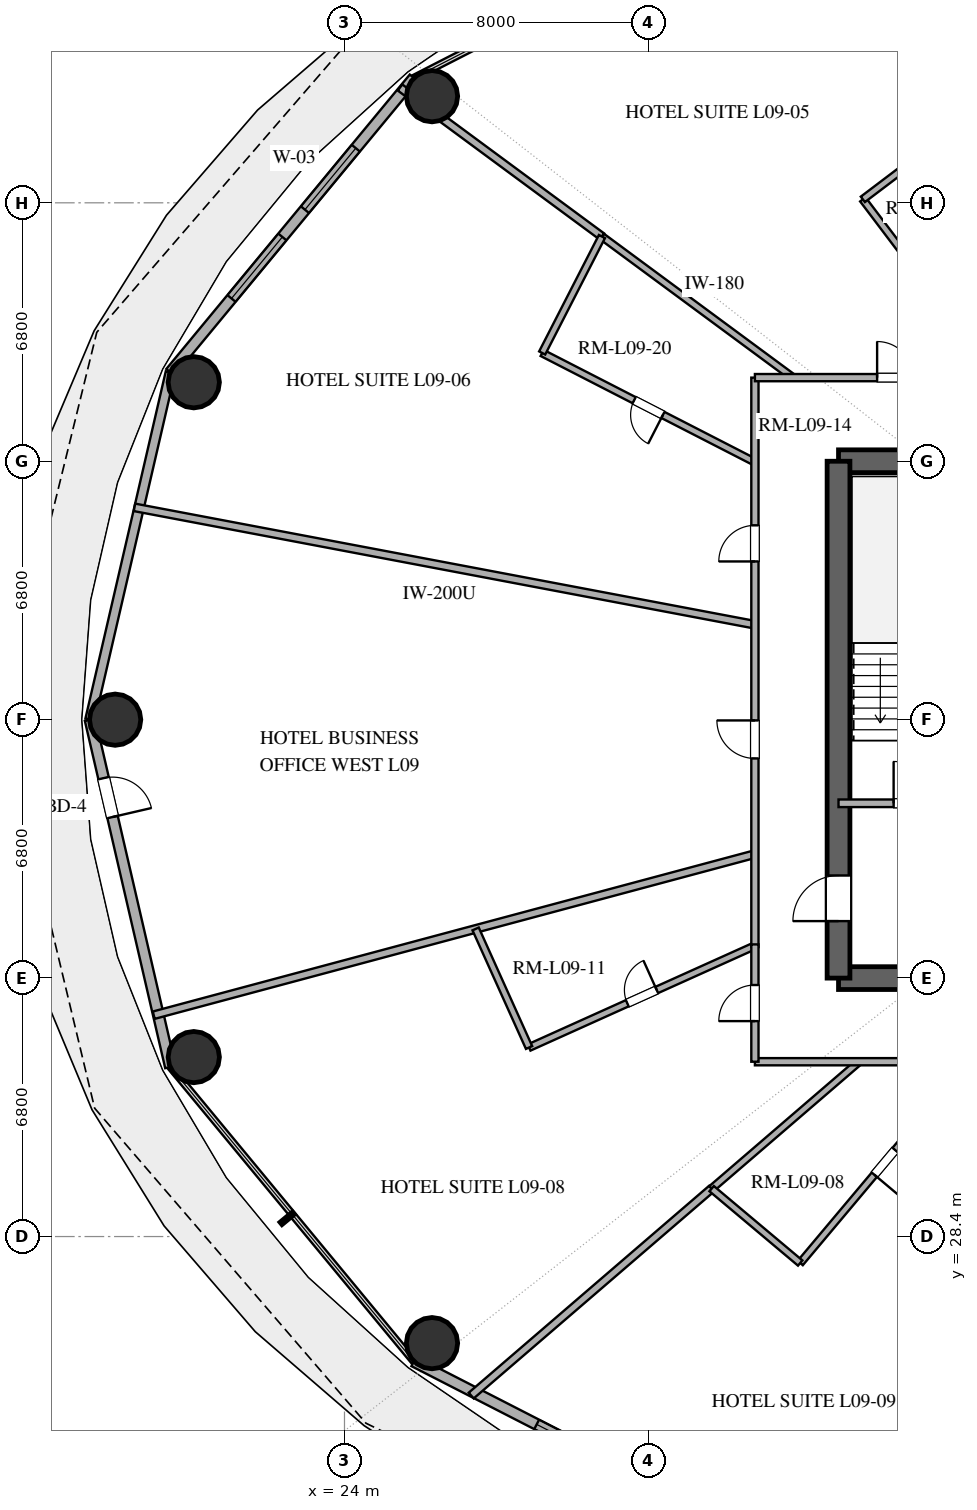
"""IFC4 building model, lengths in metres.
Left out: names, types, materials, properties, quantities, classifications, styles, units other than length and angle.
Written with IfcOpenShell. Run it as: python <this file> out.ifc"""

import sys

from ifc_helpers import new_model, si_unit, direction, frame, frame_2d, origin, origin_2d, place, context, subcontext, project, spatial, rectangle, hollow_circle, extrude, element, fill, save


model = new_model("IFC4")
c1 = context("Model", 3, precision=1e-05, world=origin(), true_north=direction((0.0, 1.0)))
c2 = subcontext(c1, "Body", "Model", "MODEL_VIEW")
j1 = project(units=[si_unit("LENGTHUNIT", "METRE"), si_unit("PLANEANGLEUNIT", "RADIAN")], contexts=[c1])
p1 = place(None, origin())
s1 = spatial("IfcSite", under=j1, at=p1, CompositionType="ELEMENT")
p2 = place(p1, origin())
s2 = spatial("IfcBuilding", under=s1, at=p2, CompositionType="ELEMENT")
p3 = place(p2, frame((0.0, 0.0, 42.6)))
s3 = spatial("IfcBuildingStorey", under=s2, at=p3, CompositionType="ELEMENT", Elevation=42.6)
for number, where, z_axis, x_axis in (
    (1, (37.0, 35.2, 0.0), (0.0, 0.0, 1.0), (1.0, 0.0, 0.0)),
    (2, (37.0, 48.8, 0.0), (0.0, 0.0, 1.0), (1.0, 0.0, 0.0)),
):
    element("IfcWall", number, at=place(p3, frame(where, z_axis=z_axis, x_axis=x_axis)), inside=s3, PredefinedType="SHEAR", context=c2, shape_type="SweptSolid", body=[
        extrude(rectangle(XDim=4.0, YDim=0.6, at=frame_2d((2.0, 0.0))), origin(), (0.0, 0.0, 1.0), 3.38),
    ])
p4 = place(p3, frame((37.0, 35.2, 0.0), z_axis=(0.0, 0.0, 1.0), x_axis=(0.0, 1.0, 0.0)))
e3 = element("IfcWall", 3, at=p4, inside=s3, PredefinedType="SHEAR", context=c2, shape_type="SweptSolid", body=[
    extrude(rectangle(XDim=13.6, YDim=0.6, at=frame_2d((6.8, 0.0))), origin(), (0.0, 0.0, 1.0), 3.38),
])
p5 = place(p4, frame((1.5, 0.0, 0.0)))
e4 = element("IfcOpeningElement", 4, at=p5, cuts=e3, PredefinedType="OPENING", context=c2, shape_type="SweptSolid", body=[
    extrude(rectangle(XDim=1.2, YDim=2.15, at=frame_2d((0.6, 1.075))), frame((0.0, 0.31, 0.0), z_axis=(0.0, -1.0, 0.0), x_axis=(1.0, 0.0, 0.0)), (0.0, 0.0, 1.0), 0.62),
])
for number, where, z_axis, x_axis in (
    (5, (26.303, 58.405, 0.0), (0.0, 0.0, 1.0), (1.0, 0.0, 0.0)),
    (6, (20.034, 50.878, 0.0), (0.0, 0.0, 1.0), (1.0, 0.0, 0.0)),
    (7, (17.965, 42.0, 0.0), (0.0, 0.0, 1.0), (1.0, 0.0, 0.0)),
    (8, (20.034, 33.122, 0.0), (0.0, 0.0, 1.0), (1.0, 0.0, 0.0)),
    (9, (26.303, 25.595, 0.0), (0.0, 0.0, 1.0), (1.0, 0.0, 0.0)),
):
    element("IfcColumn", number, at=place(p3, frame(where, z_axis=z_axis, x_axis=x_axis)), inside=s3, PredefinedType="COLUMN", context=c2, shape_type="SweptSolid", body=[
        extrude(hollow_circle(Radius=0.675, WallThickness=0.036, at=origin_2d()), origin(), (0.0, 0.0, 1.0), 3.38),
    ])
p6 = place(p3, frame((25.826, 58.886, 0.0), z_axis=(0.0, 0.0, 1.0), x_axis=(-0.637296809613, -0.770618437657, 0.0)))
e10 = element("IfcWall", 10, at=p6, inside=s3, PredefinedType="SOLIDWALL", context=c2, shape_type="SweptSolid", body=[
    extrude(rectangle(XDim=10.053, YDim=0.28, at=frame_2d((5.027, 0.0))), origin(), (0.0, 0.0, 1.0), 3.38),
])
p7 = place(p6, frame((2.398, 0.0, 0.85)))
e11 = element("IfcOpeningElement", 11, at=p7, cuts=e10, PredefinedType="OPENING", context=c2, shape_type="SweptSolid", body=[
    extrude(rectangle(XDim=2.1, YDim=2.2, at=frame_2d((1.05, 1.1))), frame((0.0, 0.15, 0.0), z_axis=(0.0, -1.0, 0.0), x_axis=(1.0, 0.0, 0.0)), (0.0, 0.0, 1.0), 0.3),
])
p8 = place(p6, frame((5.43, 0.0, 0.85)))
e12 = element("IfcOpeningElement", 12, at=p8, cuts=e10, PredefinedType="OPENING", context=c2, shape_type="SweptSolid", body=[
    extrude(rectangle(XDim=2.1, YDim=2.2, at=frame_2d((1.05, 1.1))), frame((0.0, 0.15, 0.0), z_axis=(0.0, -1.0, 0.0), x_axis=(1.0, 0.0, 0.0)), (0.0, 0.0, 1.0), 0.3),
])
p9 = place(p3, frame((19.419, 51.138, 0.0), z_axis=(0.0, 0.0, 1.0), x_axis=(-0.225454452941, -0.974253709076, 0.0)))
e13 = element("IfcWall", 13, at=p9, inside=s3, PredefinedType="SOLIDWALL", context=c2, shape_type="SweptSolid", body=[
    extrude(rectangle(XDim=9.38, YDim=0.25, at=frame_2d((4.69, 0.0))), origin(), (0.0, 0.0, 1.0), 3.38),
])
p10 = place(p3, frame((17.304, 42.0, 0.0), z_axis=(0.0, 0.0, 1.0), x_axis=(0.225454452941, -0.974253709076, 0.0)))
e14 = element("IfcWall", 14, at=p10, inside=s3, PredefinedType="SOLIDWALL", context=c2, shape_type="SweptSolid", body=[
    extrude(rectangle(XDim=9.38, YDim=0.28, at=frame_2d((4.69, 0.0))), origin(), (0.0, 0.0, 1.0), 3.38),
])
p11 = place(p10, frame((1.579, 0.0, 0.0)))
e15 = element("IfcOpeningElement", 15, at=p11, cuts=e14, PredefinedType="OPENING", context=c2, shape_type="SweptSolid", body=[
    extrude(rectangle(XDim=1.05, YDim=2.2, at=frame_2d((0.525, 1.1))), frame((0.0, 0.15, 0.0), z_axis=(0.0, -1.0, 0.0), x_axis=(1.0, 0.0, 0.0)), (0.0, 0.0, 1.0), 0.3),
])
p12 = place(p3, frame((25.826, 25.114, 0.0), z_axis=(0.0, 0.0, 1.0), x_axis=(0.889853976658, -0.456245438581, 0.0)))
e16 = element("IfcWall", 16, at=p12, inside=s3, PredefinedType="SOLIDWALL", context=c2, shape_type="SweptSolid", body=[
    extrude(rectangle(XDim=11.346, YDim=0.28, at=frame_2d((5.673, 0.0))), origin(), (0.0, 0.0, 1.0), 3.38),
])
p13 = place(p12, frame((3.632, 0.0, 0.85)))
e17 = element("IfcOpeningElement", 17, at=p13, cuts=e16, PredefinedType="OPENING", context=c2, shape_type="SweptSolid", body=[
    extrude(rectangle(XDim=1.5, YDim=1.8, at=frame_2d((0.75, 0.9))), frame((0.0, 0.15, 0.0), z_axis=(0.0, -1.0, 0.0), x_axis=(1.0, 0.0, 0.0)), (0.0, 0.0, 1.0), 0.3),
])
p14 = place(p12, frame((6.761, 0.0, 0.85)))
e18 = element("IfcOpeningElement", 18, at=p14, cuts=e16, PredefinedType="OPENING", context=c2, shape_type="SweptSolid", body=[
    extrude(rectangle(XDim=1.5, YDim=1.8, at=frame_2d((0.75, 0.9))), frame((0.0, 0.15, 0.0), z_axis=(0.0, -1.0, 0.0), x_axis=(1.0, 0.0, 0.0)), (0.0, 0.0, 1.0), 0.3),
])
p15 = place(p3, frame((37.0, 39.8, 0.0), z_axis=(0.0, 0.0, 1.0), x_axis=(1.0, 0.0, 0.0)))
e19 = element("IfcWall", 19, at=p15, inside=s3, PredefinedType="SOLIDWALL", context=c2, shape_type="SweptSolid", body=[
    extrude(rectangle(XDim=4.0, YDim=0.2, at=frame_2d((2.0, 0.0))), origin(), (0.0, 0.0, 1.0), 2.74),
])
p16 = place(p15, frame((1.45, 0.0, 0.0)))
e20 = element("IfcOpeningElement", 20, at=p16, cuts=e19, PredefinedType="OPENING", context=c2, shape_type="SweptSolid", body=[
    extrude(rectangle(XDim=1.1, YDim=2.15, at=frame_2d((0.55, 1.075))), frame((0.0, 0.11, 0.0), z_axis=(0.0, -1.0, 0.0), x_axis=(1.0, 0.0, 0.0)), (0.0, 0.0, 1.0), 0.22),
])
p17 = place(p3, frame((34.8, 44.498, 0.0), z_axis=(0.0, 0.0, 1.0), x_axis=(-0.982565603173, 0.185916205484, 0.0)))
e21 = element("IfcWall", 21, at=p17, inside=s3, PredefinedType="PARTITIONING", context=c2, shape_type="SweptSolid", body=[
    extrude(rectangle(XDim=16.616, YDim=0.2, at=frame_2d((8.308, 0.0))), origin(), (0.0, 0.0, 1.0), 2.74),
])
p18 = place(p3, frame((34.8, 38.463, 0.0), z_axis=(0.0, 0.0, 1.0), x_axis=(-0.965922233104, -0.258832454679, 0.0)))
e22 = element("IfcWall", 22, at=p18, inside=s3, PredefinedType="PARTITIONING", context=c2, shape_type="SweptSolid", body=[
    extrude(rectangle(XDim=16.377, YDim=0.2, at=frame_2d((8.189, 0.0))), origin(), (0.0, 0.0, 1.0), 2.74),
])
p19 = place(p3, frame((27.334, 24.216, 0.0), z_axis=(0.0, 0.0, 1.0), x_axis=(0.757966817992, 0.652293111127, 0.0)))
e23 = element("IfcWall", 23, at=p19, inside=s3, PredefinedType="PARTITIONING", context=c2, shape_type="SweptSolid", body=[
    extrude(rectangle(XDim=8.347, YDim=0.2, at=frame_2d((4.174, 0.0))), origin(), (0.0, 0.0, 1.0), 2.74),
])
p20 = place(p3, frame((44.073, 33.0, 0.0), z_axis=(0.0, 0.0, 1.0), x_axis=(-0.399884283786, -0.916565632991, 0.0)))
e24 = element("IfcWall", 24, at=p20, inside=s3, PredefinedType="PARTITIONING", context=c2, shape_type="SweptSolid", body=[
    extrude(rectangle(XDim=14.749, YDim=0.2, at=frame_2d((7.375, 0.0))), origin(), (0.0, 0.0, 1.0), 2.74),
])
p21 = place(p3, frame((43.243, 51.0, 0.0), z_axis=(0.0, 0.0, 1.0), x_axis=(-0.467270516294, 0.884114395654, 0.0)))
e25 = element("IfcWall", 25, at=p21, inside=s3, PredefinedType="PARTITIONING", context=c2, shape_type="SweptSolid", body=[
    extrude(rectangle(XDim=14.96, YDim=0.2, at=frame_2d((7.48, 0.0))), origin(), (0.0, 0.0, 1.0), 2.74),
])
p22 = place(p3, frame((40.44, 33.0, 0.0), z_axis=(0.0, 0.0, 1.0), x_axis=(-0.643154836645, -0.765736153058, 0.0)))
e26 = element("IfcWall", 26, at=p22, inside=s3, PredefinedType="PLUMBINGWALL", context=c2, shape_type="SweptSolid", body=[
    extrude(rectangle(XDim=6.917, YDim=0.18, at=frame_2d((3.458, 0.0))), origin(), (0.0, 0.0, 1.0), 2.74),
])
p23 = place(p22, frame((3.034, 0.0, 0.0)))
e27 = element("IfcOpeningElement", 27, at=p23, cuts=e26, PredefinedType="OPENING", context=c2, shape_type="SweptSolid", body=[
    extrude(rectangle(XDim=0.85, YDim=2.1, at=frame_2d((0.425, 1.05))), frame((0.0, 0.1, 0.0), z_axis=(0.0, -1.0, 0.0), x_axis=(1.0, 0.0, 0.0)), (0.0, 0.0, 1.0), 0.2),
])
p24 = place(p3, frame((25.462, 58.634, 0.0), z_axis=(0.0, 0.0, 1.0), x_axis=(0.804616980297, -0.593794168898, 0.0)))
e28 = element("IfcWall", 28, at=p24, inside=s3, PredefinedType="PARTITIONING", context=c2, shape_type="SweptSolid", body=[
    extrude(rectangle(XDim=6.603, YDim=0.2, at=frame_2d((3.302, 0.0))), origin(), (0.0, 0.0, 1.0), 2.74),
])
p25 = place(p3, frame((28.857, 33.374, 0.0), z_axis=(0.0, 0.0, 1.0), x_axis=(0.911702033518, 0.410852044025, 0.0)))
e29 = element("IfcWall", 29, at=p25, inside=s3, PredefinedType="PLUMBINGWALL", context=c2, shape_type="SweptSolid", body=[
    extrude(rectangle(XDim=6.519, YDim=0.18, at=frame_2d((3.259, 0.0))), origin(), (0.0, 0.0, 1.0), 2.74),
])
p26 = place(p25, frame((2.834, 0.0, 0.0)))
e30 = element("IfcOpeningElement", 30, at=p26, cuts=e29, PredefinedType="OPENING", context=c2, shape_type="SweptSolid", body=[
    extrude(rectangle(XDim=0.85, YDim=2.1, at=frame_2d((0.425, 1.05))), frame((0.0, 0.1, 0.0), z_axis=(0.0, -1.0, 0.0), x_axis=(1.0, 0.0, 0.0)), (0.0, 0.0, 1.0), 0.2),
])
p27 = place(p3, frame((34.8, 48.776, 0.0), z_axis=(0.0, 0.0, 1.0), x_axis=(-0.889651376734, 0.456640370395, 0.0)))
e31 = element("IfcWall", 31, at=p27, inside=s3, PredefinedType="PLUMBINGWALL", context=c2, shape_type="SweptSolid", body=[
    extrude(rectangle(XDim=6.292, YDim=0.18, at=frame_2d((3.146, 0.0))), origin(), (0.0, 0.0, 1.0), 2.74),
])
p28 = place(p27, frame((2.721, 0.0, 0.0)))
e32 = element("IfcOpeningElement", 32, at=p28, cuts=e31, PredefinedType="OPENING", context=c2, shape_type="SweptSolid", body=[
    extrude(rectangle(XDim=0.85, YDim=2.1, at=frame_2d((0.425, 1.05))), frame((0.0, 0.1, 0.0), z_axis=(0.0, -1.0, 0.0), x_axis=(1.0, 0.0, 0.0)), (0.0, 0.0, 1.0), 0.2),
])
p29 = place(p3, frame((30.775, 54.713, 0.0), z_axis=(0.0, 0.0, 1.0), x_axis=(0.804582519588, -0.593840861825, 0.0)))
e33 = element("IfcWall", 33, at=p29, inside=s3, PredefinedType="PLUMBINGWALL", context=c2, shape_type="SweptSolid", body=[
    extrude(rectangle(XDim=6.252, YDim=0.18, at=frame_2d((3.126, 0.0))), origin(), (0.0, 0.0, 1.0), 2.74),
])
p30 = place(p3, frame((34.8, 36.017, 0.0), z_axis=(0.0, 0.0, 1.0), x_axis=(0.0, 1.0, 0.0)))
e34 = element("IfcWall", 34, at=p30, inside=s3, PredefinedType="PARTITIONING", context=c2, shape_type="SweptSolid", body=[
    extrude(rectangle(XDim=14.983, YDim=0.19, at=frame_2d((7.492, 0.0))), origin(), (0.0, 0.0, 1.0), 2.74),
])
p31 = place(p30, frame((4.963, 0.0, 0.0)))
e35 = element("IfcOpeningElement", 35, at=p31, cuts=e34, PredefinedType="OPENING", context=c2, shape_type="SweptSolid", body=[
    extrude(rectangle(XDim=1.0, YDim=2.2, at=frame_2d((0.5, 1.1))), frame((0.0, 0.105, 0.0), z_axis=(0.0, -1.0, 0.0), x_axis=(1.0, 0.0, 0.0)), (0.0, 0.0, 1.0), 0.21),
])
p32 = place(p30, frame((10.146, 0.0, 0.0)))
e36 = element("IfcOpeningElement", 36, at=p32, cuts=e34, PredefinedType="OPENING", context=c2, shape_type="SweptSolid", body=[
    extrude(rectangle(XDim=0.95, YDim=2.15, at=frame_2d((0.475, 1.075))), frame((0.0, 0.105, 0.0), z_axis=(0.0, -1.0, 0.0), x_axis=(1.0, 0.0, 0.0)), (0.0, 0.0, 1.0), 0.21),
])
p33 = place(p3, frame((37.64, 55.691, 0.0), z_axis=(0.0, 0.0, 1.0), x_axis=(0.603401299207, -0.797437691682, 0.0)))
e37 = element("IfcWall", 37, at=p33, inside=s3, PredefinedType="PLUMBINGWALL", context=c2, shape_type="SweptSolid", body=[
    extrude(rectangle(XDim=5.882, YDim=0.18, at=frame_2d((2.941, 0.0))), origin(), (0.0, 0.0, 1.0), 2.74),
])
p34 = place(p33, frame((2.516, 0.0, 0.0)))
e38 = element("IfcOpeningElement", 38, at=p34, cuts=e37, PredefinedType="OPENING", context=c2, shape_type="SweptSolid", body=[
    extrude(rectangle(XDim=0.85, YDim=2.1, at=frame_2d((0.425, 1.05))), frame((0.0, 0.1, 0.0), z_axis=(0.0, -1.0, 0.0), x_axis=(1.0, 0.0, 0.0)), (0.0, 0.0, 1.0), 0.2),
])
p35 = place(p3, frame((34.8, 51.0, 0.0), z_axis=(0.0, 0.0, 1.0), x_axis=(1.0, 0.0, 0.0)))
e39 = element("IfcWall", 39, at=p35, inside=s3, PredefinedType="PARTITIONING", context=c2, shape_type="SweptSolid", body=[
    extrude(rectangle(XDim=8.479, YDim=0.19, at=frame_2d((4.24, 0.0))), origin(), (0.0, 0.0, 1.0), 2.74),
])
p36 = place(p35, frame((3.216, 0.0, 0.0)))
e40 = element("IfcOpeningElement", 40, at=p36, cuts=e39, PredefinedType="OPENING", context=c2, shape_type="SweptSolid", body=[
    extrude(rectangle(XDim=0.95, YDim=2.15, at=frame_2d((0.475, 1.075))), frame((0.0, 0.105, 0.0), z_axis=(0.0, -1.0, 0.0), x_axis=(1.0, 0.0, 0.0)), (0.0, 0.0, 1.0), 0.21),
])
p37 = place(p3, frame((33.661, 29.661, 0.0), z_axis=(0.0, 0.0, 1.0), x_axis=(0.757969199921, 0.652290343307, 0.0)))
e41 = element("IfcWall", 41, at=p37, inside=s3, PredefinedType="PLUMBINGWALL", context=c2, shape_type="SweptSolid", body=[
    extrude(rectangle(XDim=5.119, YDim=0.18, at=frame_2d((2.56, 0.0))), origin(), (0.0, 0.0, 1.0), 2.74),
])
p38 = place(p3, frame((44.108, 33.0, 0.0), z_axis=(0.0, 0.0, 1.0), x_axis=(-1.0, 0.0, 0.0)))
e42 = element("IfcWall", 42, at=p38, inside=s3, PredefinedType="PARTITIONING", context=c2, shape_type="SweptSolid", body=[
    extrude(rectangle(XDim=9.308, YDim=0.19, at=frame_2d((4.654, 0.0))), origin(), (0.0, 0.0, 1.0), 2.74),
])
p39 = place(p38, frame((1.38, 0.0, 0.0)))
e43 = element("IfcOpeningElement", 43, at=p39, cuts=e42, PredefinedType="OPENING", context=c2, shape_type="SweptSolid", body=[
    extrude(rectangle(XDim=0.95, YDim=2.15, at=frame_2d((0.475, 1.075))), frame((0.0, 0.105, 0.0), z_axis=(0.0, -1.0, 0.0), x_axis=(1.0, 0.0, 0.0)), (0.0, 0.0, 1.0), 0.21),
])
p40 = place(p3, frame((29.202, 51.649, 0.0), z_axis=(0.0, 0.0, 1.0), x_axis=(0.456659133546, 0.889641745732, 0.0)))
e44 = element("IfcWall", 44, at=p40, inside=s3, PredefinedType="PLUMBINGWALL", context=c2, shape_type="SweptSolid", body=[
    extrude(rectangle(XDim=3.444, YDim=0.18, at=frame_2d((1.722, 0.0))), origin(), (0.0, 0.0, 1.0), 2.74),
])
p41 = place(p3, frame((27.451, 36.494, 0.0), z_axis=(0.0, 0.0, 1.0), x_axis=(0.410839223928, -0.911707810695, 0.0)))
e45 = element("IfcWall", 45, at=p41, inside=s3, PredefinedType="PLUMBINGWALL", context=c2, shape_type="SweptSolid", body=[
    extrude(rectangle(XDim=3.422, YDim=0.18, at=frame_2d((1.711, 0.0))), origin(), (0.0, 0.0, 1.0), 2.74),
])
p42 = place(p3, frame((34.8, 33.0, 0.0), z_axis=(0.0, 0.0, 1.0), x_axis=(0.0, 1.0, 0.0)))
e46 = element("IfcWall", 46, at=p42, inside=s3, PredefinedType="PARTITIONING", context=c2, shape_type="SweptSolid", body=[
    extrude(rectangle(XDim=3.087, YDim=0.19, at=frame_2d((1.543, 0.0))), origin(), (0.0, 0.0, 1.0), 2.74),
])
p43 = place(p42, frame((1.069, 0.0, 0.0)))
e47 = element("IfcOpeningElement", 47, at=p43, cuts=e46, PredefinedType="OPENING", context=c2, shape_type="SweptSolid", body=[
    extrude(rectangle(XDim=0.95, YDim=2.15, at=frame_2d((0.475, 1.075))), frame((0.0, 0.105, 0.0), z_axis=(0.0, -1.0, 0.0), x_axis=(1.0, 0.0, 0.0)), (0.0, 0.0, 1.0), 0.21),
])
p44 = place(p3, frame((35.992, 27.703, 0.0), z_axis=(0.0, 0.0, 1.0), x_axis=(-0.765736471754, 0.643154457208, 0.0)))
e48 = element("IfcWall", 48, at=p44, inside=s3, PredefinedType="PLUMBINGWALL", context=c2, shape_type="SweptSolid", body=[
    extrude(rectangle(XDim=3.043, YDim=0.18, at=frame_2d((1.521, 0.0))), origin(), (0.0, 0.0, 1.0), 2.74),
])
p45 = place(p3, frame((39.872, 57.379, 0.0), z_axis=(0.0, 0.0, 1.0), x_axis=(-0.797438154909, -0.603400687019, 0.0)))
e49 = element("IfcWall", 49, at=p45, inside=s3, PredefinedType="PLUMBINGWALL", context=c2, shape_type="SweptSolid", body=[
    extrude(rectangle(XDim=2.798, YDim=0.18, at=frame_2d((1.399, 0.0))), origin(), (0.0, 0.0, 1.0), 2.74),
])
p46 = place(p7, origin())
e50 = element("IfcWindow", 50, at=p46, inside=s3, PartitioningType="SINGLE_PANEL", PredefinedType="WINDOW", context=c2, shape_type="SweptSolid", body=[
    extrude(rectangle(XDim=2.1, YDim=2.2, at=frame_2d((1.05, 1.1))), frame((0.0, 0.03, 0.0), z_axis=(0.0, -1.0, 0.0), x_axis=(1.0, 0.0, 0.0)), (0.0, 0.0, 1.0), 0.06),
])
fill(e11, e50)
p47 = place(p8, origin())
e51 = element("IfcWindow", 51, at=p47, inside=s3, PartitioningType="SINGLE_PANEL", PredefinedType="WINDOW", context=c2, shape_type="SweptSolid", body=[
    extrude(rectangle(XDim=2.1, YDim=2.2, at=frame_2d((1.05, 1.1))), frame((0.0, 0.03, 0.0), z_axis=(0.0, -1.0, 0.0), x_axis=(1.0, 0.0, 0.0)), (0.0, 0.0, 1.0), 0.06),
])
fill(e12, e51)
p48 = place(p11, origin())
e52 = element("IfcDoor", 52, at=p48, inside=s3, OperationType="SINGLE_SWING_RIGHT", PredefinedType="DOOR", context=c2, shape_type="SweptSolid", body=[
    extrude(rectangle(XDim=1.05, YDim=2.2, at=frame_2d((0.525, 1.1))), frame((0.0, 0.025, 0.0), z_axis=(0.0, -1.0, 0.0), x_axis=(1.0, 0.0, 0.0)), (0.0, 0.0, 1.0), 0.05),
])
fill(e15, e52)
p49 = place(p13, origin())
e53 = element("IfcWindow", 53, at=p49, inside=s3, PartitioningType="SINGLE_PANEL", PredefinedType="WINDOW", context=c2, shape_type="SweptSolid", body=[
    extrude(rectangle(XDim=1.5, YDim=1.8, at=frame_2d((0.75, 0.9))), frame((0.0, 0.03, 0.0), z_axis=(0.0, -1.0, 0.0), x_axis=(1.0, 0.0, 0.0)), (0.0, 0.0, 1.0), 0.06),
])
fill(e17, e53)
p50 = place(p5, origin())
e54 = element("IfcDoor", 54, at=p50, inside=s3, OperationType="SINGLE_SWING_LEFT", PredefinedType="DOOR", context=c2, shape_type="SweptSolid", body=[
    extrude(rectangle(XDim=1.2, YDim=2.15, at=frame_2d((0.6, 1.075))), frame((0.0, 0.025, 0.0), z_axis=(0.0, -1.0, 0.0), x_axis=(1.0, 0.0, 0.0)), (0.0, 0.0, 1.0), 0.05),
])
fill(e4, e54)
p51 = place(p16, origin())
e55 = element("IfcDoor", 55, at=p51, inside=s3, OperationType="SINGLE_SWING_LEFT", PredefinedType="DOOR", context=c2, shape_type="SweptSolid", body=[
    extrude(rectangle(XDim=1.1, YDim=2.15, at=frame_2d((0.55, 1.075))), frame((0.0, 0.025, 0.0), z_axis=(0.0, -1.0, 0.0), x_axis=(1.0, 0.0, 0.0)), (0.0, 0.0, 1.0), 0.05),
])
fill(e20, e55)
p52 = place(p23, origin())
e56 = element("IfcDoor", 56, at=p52, inside=s3, OperationType="SINGLE_SWING_RIGHT", PredefinedType="DOOR", context=c2, shape_type="SweptSolid", body=[
    extrude(rectangle(XDim=0.85, YDim=2.1, at=frame_2d((0.425, 1.05))), frame((0.0, 0.025, 0.0), z_axis=(0.0, -1.0, 0.0), x_axis=(1.0, 0.0, 0.0)), (0.0, 0.0, 1.0), 0.05),
])
fill(e27, e56)
p53 = place(p26, origin())
e57 = element("IfcDoor", 57, at=p53, inside=s3, OperationType="SINGLE_SWING_RIGHT", PredefinedType="DOOR", context=c2, shape_type="SweptSolid", body=[
    extrude(rectangle(XDim=0.85, YDim=2.1, at=frame_2d((0.425, 1.05))), frame((0.0, 0.025, 0.0), z_axis=(0.0, -1.0, 0.0), x_axis=(1.0, 0.0, 0.0)), (0.0, 0.0, 1.0), 0.05),
])
fill(e30, e57)
p54 = place(p28, origin())
e58 = element("IfcDoor", 58, at=p54, inside=s3, OperationType="SINGLE_SWING_LEFT", PredefinedType="DOOR", context=c2, shape_type="SweptSolid", body=[
    extrude(rectangle(XDim=0.85, YDim=2.1, at=frame_2d((0.425, 1.05))), frame((0.0, 0.025, 0.0), z_axis=(0.0, -1.0, 0.0), x_axis=(1.0, 0.0, 0.0)), (0.0, 0.0, 1.0), 0.05),
])
fill(e32, e58)
p55 = place(p31, origin())
e59 = element("IfcDoor", 59, at=p55, inside=s3, OperationType="SINGLE_SWING_RIGHT", PredefinedType="DOOR", context=c2, shape_type="SweptSolid", body=[
    extrude(rectangle(XDim=1.0, YDim=2.2, at=frame_2d((0.5, 1.1))), frame((0.0, 0.025, 0.0), z_axis=(0.0, -1.0, 0.0), x_axis=(1.0, 0.0, 0.0)), (0.0, 0.0, 1.0), 0.05),
])
fill(e35, e59)
p56 = place(p32, origin())
e60 = element("IfcDoor", 60, at=p56, inside=s3, OperationType="SINGLE_SWING_LEFT", PredefinedType="DOOR", context=c2, shape_type="SweptSolid", body=[
    extrude(rectangle(XDim=0.95, YDim=2.15, at=frame_2d((0.475, 1.075))), frame((0.0, 0.025, 0.0), z_axis=(0.0, -1.0, 0.0), x_axis=(1.0, 0.0, 0.0)), (0.0, 0.0, 1.0), 0.05),
])
fill(e36, e60)
p57 = place(p36, origin())
e61 = element("IfcDoor", 61, at=p57, inside=s3, OperationType="SINGLE_SWING_LEFT", PredefinedType="DOOR", context=c2, shape_type="SweptSolid", body=[
    extrude(rectangle(XDim=0.95, YDim=2.15, at=frame_2d((0.475, 1.075))), frame((0.0, 0.025, 0.0), z_axis=(0.0, -1.0, 0.0), x_axis=(1.0, 0.0, 0.0)), (0.0, 0.0, 1.0), 0.05),
])
fill(e40, e61)
p58 = place(p43, origin())
e62 = element("IfcDoor", 62, at=p58, inside=s3, OperationType="SINGLE_SWING_LEFT", PredefinedType="DOOR", context=c2, shape_type="SweptSolid", body=[
    extrude(rectangle(XDim=0.95, YDim=2.15, at=frame_2d((0.475, 1.075))), frame((0.0, 0.025, 0.0), z_axis=(0.0, -1.0, 0.0), x_axis=(1.0, 0.0, 0.0)), (0.0, 0.0, 1.0), 0.05),
])
fill(e47, e62)
save(model, sys.argv[1])
